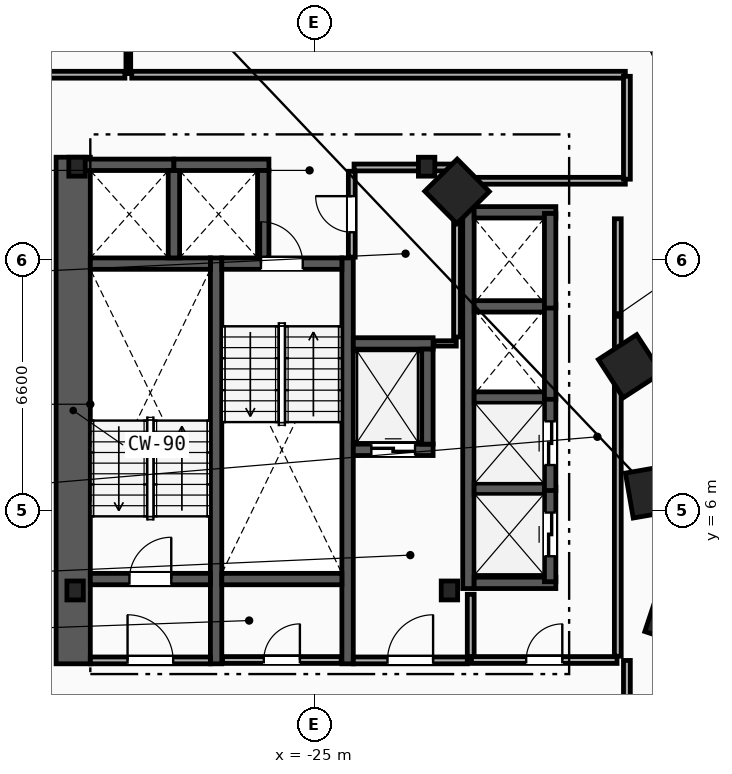
"""IFC4 building model, lengths in metres.
Left out: names, types, materials, properties, quantities, classifications, styles, units other than length and angle.
Written with IfcOpenShell. Run it as: python <this file> out.ifc"""

import sys

from ifc_helpers import new_model, si_unit, direction, frame, frame_2d, origin, origin_2d, place, context, subcontext, project, spatial, rectangle, i_section, extrude, element, fill, save


model = new_model("IFC4")
c1 = context("Model", 3, precision=1e-05, world=origin(), true_north=direction((0.0, 1.0)))
c2 = subcontext(c1, "Body", "Model", "MODEL_VIEW")
j1 = project(units=[si_unit("LENGTHUNIT", "METRE"), si_unit("PLANEANGLEUNIT", "RADIAN")], contexts=[c1])
p1 = place(None, origin())
s1 = spatial("IfcSite", under=j1, at=p1, CompositionType="ELEMENT")
p2 = place(p1, origin())
s2 = spatial("IfcBuilding", under=s1, at=p2, CompositionType="ELEMENT")
p3 = place(p2, frame((0.0, 0.0, 69.6)))
s3 = spatial("IfcBuildingStorey", under=s2, at=p3, CompositionType="ELEMENT", Elevation=69.6)
for number, where, z_axis, x_axis in (
    (1, (-31.3, 3.9, 0.0), (0.0, 0.0, 1.0), (1.0, 0.0, 0.0)),
    (2, (-21.45, 3.9, 0.0), (0.0, 0.0, 1.0), (1.0, 0.0, 0.0)),
    (3, (-22.05, 15.05, 0.0), (0.0, 0.0, 1.0), (1.0, 0.0, 0.0)),
    (4, (-31.25, 15.05, 0.0), (0.0, 0.0, 1.0), (1.0, 0.0, 0.0)),
):
    element("IfcColumn", number, at=place(p3, frame(where, z_axis=z_axis, x_axis=x_axis)), inside=s3, PredefinedType="COLUMN", context=c2, shape_type="SweptSolid", body=[
        extrude(i_section(OverallWidth=0.432, OverallDepth=0.498, WebThickness=0.056, FlangeThickness=0.089, FilletRadius=0.018, at=origin_2d()), origin(), (0.0, 0.0, 1.0), 3.8),
    ])
for number, where, z_axis, x_axis in (
    (5, (-15.55, 3.2, 0.0), (0.0, 0.0, 1.0), (0.315, 0.949, 0.0)),
    (6, (-16.125, 6.5, 0.0), (0.0, 0.0, 1.0), (-0.172, 0.985, 0.0)),
    (7, (-16.7, 9.8, 0.0), (0.0, 0.0, 1.0), (-0.544, 0.839, 0.0)),
    (8, (-21.25, 14.4, 0.0), (0.0, 0.0, 1.0), (-0.703, 0.711, 0.0)),
):
    element("IfcColumn", number, at=place(p3, frame(where, z_axis=z_axis, x_axis=x_axis)), inside=s3, PredefinedType="COLUMN", context=c2, shape_type="SweptSolid", body=[
        extrude(rectangle(XDim=1.2, YDim=1.2, at=origin_2d()), origin(), (0.0, 0.0, 1.0), 3.8),
    ])
p4 = place(p3, frame((-31.35, 1.97, 0.0), z_axis=(0.0, 0.0, 1.0), x_axis=(0.0, 1.0, 0.0)))
e9 = element("IfcWall", 9, at=p4, inside=s3, PredefinedType="SHEAR", context=c2, shape_type="SweptSolid", body=[
    extrude(rectangle(XDim=13.33, YDim=0.9, at=frame_2d((6.665, 0.0))), origin(), (0.0, 0.0, 1.0), 3.5),
])
for number, where, z_axis, x_axis in (
    (10, (-27.59, 1.97, 0.0), (0.0, 0.0, 1.0), (0.0, 1.0, 0.0)),
    (11, (-24.13, 1.97, 0.0), (0.0, 0.0, 1.0), (0.0, 1.0, 0.0)),
):
    element("IfcWall", number, at=place(p3, frame(where, z_axis=z_axis, x_axis=x_axis)), inside=s3, PredefinedType="SHEAR", context=c2, shape_type="SweptSolid", body=[
        extrude(rectangle(XDim=10.68, YDim=0.3, at=frame_2d((5.34, 0.0))), origin(), (0.0, 0.0, 1.0), 3.5),
    ])
p5 = place(p3, frame((-30.9, 4.2, 0.0), z_axis=(0.0, 0.0, 1.0), x_axis=(1.0, 0.0, 0.0)))
e12 = element("IfcWall", 12, at=p5, inside=s3, PredefinedType="SHEAR", context=c2, shape_type="SweptSolid", body=[
    extrude(rectangle(XDim=3.16, YDim=0.3, at=frame_2d((1.58, 0.0))), origin(), (0.0, 0.0, 1.0), 3.5),
])
p6 = place(p5, frame((1.03, 0.0, 0.0)))
e13 = element("IfcOpeningElement", 13, at=p6, cuts=e12, PredefinedType="OPENING", context=c2, shape_type="SweptSolid", body=[
    extrude(rectangle(XDim=1.1, YDim=2.15, at=frame_2d((0.55, 1.075))), frame((0.0, 0.16, 0.0), z_axis=(0.0, -1.0, 0.0), x_axis=(1.0, 0.0, 0.0)), (0.0, 0.0, 1.0), 0.32),
])
p7 = place(p3, frame((-30.9, 12.5, 0.0), z_axis=(0.0, 0.0, 1.0), x_axis=(1.0, 0.0, 0.0)))
e14 = element("IfcWall", 14, at=p7, inside=s3, PredefinedType="SHEAR", context=c2, shape_type="SweptSolid", body=[
    extrude(rectangle(XDim=3.16, YDim=0.3, at=frame_2d((1.58, 0.0))), origin(), (0.0, 0.0, 1.0), 3.5),
])
p8 = place(p3, frame((-27.44, 12.5, 0.0), z_axis=(0.0, 0.0, 1.0), x_axis=(1.0, 0.0, 0.0)))
e15 = element("IfcWall", 15, at=p8, inside=s3, PredefinedType="SHEAR", context=c2, shape_type="SweptSolid", body=[
    extrude(rectangle(XDim=3.16, YDim=0.3, at=frame_2d((1.58, 0.0))), origin(), (0.0, 0.0, 1.0), 3.5),
])
p9 = place(p8, frame((1.03, 0.0, 0.0)))
e16 = element("IfcOpeningElement", 16, at=p9, cuts=e15, PredefinedType="OPENING", context=c2, shape_type="SweptSolid", body=[
    extrude(rectangle(XDim=1.1, YDim=2.15, at=frame_2d((0.55, 1.075))), frame((0.0, 0.16, 0.0), z_axis=(0.0, -1.0, 0.0), x_axis=(1.0, 0.0, 0.0)), (0.0, 0.0, 1.0), 0.32),
])
p10 = place(p3, frame((-27.44, 4.2, 0.0), z_axis=(0.0, 0.0, 1.0), x_axis=(1.0, 0.0, 0.0)))
e17 = element("IfcWall", 17, at=p10, inside=s3, PredefinedType="SHEAR", context=c2, shape_type="SweptSolid", body=[
    extrude(rectangle(XDim=3.16, YDim=0.3, at=frame_2d((1.58, 0.0))), origin(), (0.0, 0.0, 1.0), 3.5),
])
p11 = place(p3, frame((-20.89, 2.15, 0.0), z_axis=(0.0, 0.0, 1.0), x_axis=(0.0, 1.0, 0.0)))
e18 = element("IfcWall", 18, at=p11, inside=s3, PredefinedType="PARTITIONING", context=c2, shape_type="SweptSolid", body=[
    extrude(rectangle(XDim=1.65, YDim=0.18, at=frame_2d((0.825, 0.0))), origin(), (0.0, 0.0, 1.0), 3.5),
])
p12 = place(p3, frame((-23.98, 2.06, 0.0), z_axis=(0.0, 0.0, 1.0), x_axis=(1.0, 0.0, 0.0)))
e19 = element("IfcWall", 19, at=p12, inside=s3, PredefinedType="PARTITIONING", context=c2, shape_type="SweptSolid", body=[
    extrude(rectangle(XDim=3.0, YDim=0.18, at=frame_2d((1.5, 0.0))), origin(), (0.0, 0.0, 1.0), 3.5),
])
p13 = place(p12, frame((0.9, 0.0, 0.0)))
e20 = element("IfcOpeningElement", 20, at=p13, cuts=e19, PredefinedType="OPENING", context=c2, shape_type="SweptSolid", body=[
    extrude(rectangle(XDim=1.2, YDim=2.15, at=frame_2d((0.6, 1.075))), frame((0.0, 0.1, 0.0), z_axis=(0.0, -1.0, 0.0), x_axis=(1.0, 0.0, 0.0)), (0.0, 0.0, 1.0), 0.2),
])
p14 = place(p3, frame((-30.9, 2.06, 0.0), z_axis=(0.0, 0.0, 1.0), x_axis=(1.0, 0.0, 0.0)))
e21 = element("IfcWall", 21, at=p14, inside=s3, PredefinedType="PARTITIONING", context=c2, shape_type="SweptSolid", body=[
    extrude(rectangle(XDim=3.16, YDim=0.18, at=frame_2d((1.58, 0.0))), origin(), (0.0, 0.0, 1.0), 3.5),
])
p15 = place(p14, frame((0.98, 0.0, 0.0)))
e22 = element("IfcOpeningElement", 22, at=p15, cuts=e21, PredefinedType="OPENING", context=c2, shape_type="SweptSolid", body=[
    extrude(rectangle(XDim=1.2, YDim=2.15, at=frame_2d((0.6, 1.075))), frame((0.0, 0.1, 0.0), z_axis=(0.0, -1.0, 0.0), x_axis=(1.0, 0.0, 0.0)), (0.0, 0.0, 1.0), 0.2),
])
p16 = place(p3, frame((-23.98, 7.6, 0.0), z_axis=(0.0, 0.0, 1.0), x_axis=(1.0, 0.0, 0.0)))
e23 = element("IfcWall", 23, at=p16, inside=s3, PredefinedType="SHEAR", context=c2, shape_type="SweptSolid", body=[
    extrude(rectangle(XDim=2.1, YDim=0.3, at=frame_2d((1.05, 0.0))), origin(), (0.0, 0.0, 1.0), 3.5),
])
p17 = place(p16, frame((0.475, 0.0, 0.0)))
e24 = element("IfcOpeningElement", 24, at=p17, cuts=e23, PredefinedType="OPENING", context=c2, shape_type="SweptSolid", body=[
    extrude(rectangle(XDim=1.15, YDim=2.2, at=frame_2d((0.575, 1.1))), frame((0.0, 0.16, 0.0), z_axis=(0.0, -1.0, 0.0), x_axis=(1.0, 0.0, 0.0)), (0.0, 0.0, 1.0), 0.32),
])
p18 = place(p3, frame((-23.98, 10.4, 0.0), z_axis=(0.0, 0.0, 1.0), x_axis=(1.0, 0.0, 0.0)))
e25 = element("IfcWall", 25, at=p18, inside=s3, PredefinedType="SHEAR", context=c2, shape_type="SweptSolid", body=[
    extrude(rectangle(XDim=2.1, YDim=0.3, at=frame_2d((1.05, 0.0))), origin(), (0.0, 0.0, 1.0), 3.5),
])
for number, where, z_axis, x_axis in (
    (26, (-22.03, 7.75, 0.0), (0.0, 0.0, 1.0), (0.0, 1.0, 0.0)),
    (27, (-31.2, 15.1, 0.0), (0.0, 0.0, 1.0), (1.0, 0.0, 0.0)),
):
    element("IfcWall", number, at=place(p3, frame(where, z_axis=z_axis, x_axis=x_axis)), inside=s3, PredefinedType="SHEAR", context=c2, shape_type="SweptSolid", body=[
        extrude(rectangle(XDim=2.5, YDim=0.3, at=frame_2d((1.25, 0.0))), origin(), (0.0, 0.0, 1.0), 3.5),
    ])
p19 = place(p3, frame((-28.7, 12.65, 0.0), z_axis=(0.0, 0.0, 1.0), x_axis=(0.0, 1.0, 0.0)))
e28 = element("IfcWall", 28, at=p19, inside=s3, PredefinedType="SHEAR", context=c2, shape_type="SweptSolid", body=[
    extrude(rectangle(XDim=2.3, YDim=0.3, at=frame_2d((1.15, 0.0))), origin(), (0.0, 0.0, 1.0), 3.5),
])
p20 = place(p3, frame((-28.7, 15.1, 0.0), z_axis=(0.0, 0.0, 1.0), x_axis=(1.0, 0.0, 0.0)))
e29 = element("IfcWall", 29, at=p20, inside=s3, PredefinedType="SHEAR", context=c2, shape_type="SweptSolid", body=[
    extrude(rectangle(XDim=2.5, YDim=0.3, at=frame_2d((1.25, 0.0))), origin(), (0.0, 0.0, 1.0), 3.5),
])
p21 = place(p3, frame((-26.35, 12.65, 0.0), z_axis=(0.0, 0.0, 1.0), x_axis=(0.0, 1.0, 0.0)))
e30 = element("IfcWall", 30, at=p21, inside=s3, PredefinedType="SHEAR", context=c2, shape_type="SweptSolid", body=[
    extrude(rectangle(XDim=2.3, YDim=0.3, at=frame_2d((1.15, 0.0))), origin(), (0.0, 0.0, 1.0), 3.5),
])
p22 = place(p3, frame((-20.95, 3.95, 0.0), z_axis=(0.0, 0.0, 1.0), x_axis=(0.0, 1.0, 0.0)))
e31 = element("IfcWall", 31, at=p22, inside=s3, PredefinedType="SHEAR", context=c2, shape_type="SweptSolid", body=[
    extrude(rectangle(XDim=10.05, YDim=0.3, at=frame_2d((5.025, 0.0))), origin(), (0.0, 0.0, 1.0), 3.5),
])
for number, where, z_axis, x_axis in (
    (32, (-20.8, 4.1, 0.0), (0.0, 0.0, 1.0), (1.0, 0.0, 0.0)),
    (33, (-20.8, 13.85, 0.0), (0.0, 0.0, 1.0), (1.0, 0.0, 0.0)),
):
    element("IfcWall", number, at=place(p3, frame(where, z_axis=z_axis, x_axis=x_axis)), inside=s3, PredefinedType="SHEAR", context=c2, shape_type="SweptSolid", body=[
        extrude(rectangle(XDim=2.15, YDim=0.3, at=frame_2d((1.075, 0.0))), origin(), (0.0, 0.0, 1.0), 3.5),
    ])
for number, where, z_axis, x_axis in (
    (34, (-20.8, 6.575, 0.0), (0.0, 0.0, 1.0), (1.0, 0.0, 0.0)),
    (35, (-20.8, 8.975, 0.0), (0.0, 0.0, 1.0), (1.0, 0.0, 0.0)),
    (36, (-20.8, 11.375, 0.0), (0.0, 0.0, 1.0), (1.0, 0.0, 0.0)),
):
    element("IfcWall", number, at=place(p3, frame(where, z_axis=z_axis, x_axis=x_axis)), inside=s3, PredefinedType="SHEAR", context=c2, shape_type="SweptSolid", body=[
        extrude(rectangle(XDim=1.85, YDim=0.3, at=frame_2d((0.925, 0.0))), origin(), (0.0, 0.0, 1.0), 3.5),
    ])
p23 = place(p3, frame((-18.8, 4.13, 0.0), z_axis=(0.0, 0.0, 1.0), x_axis=(0.0, 1.0, 0.0)))
e37 = element("IfcWall", 37, at=p23, inside=s3, PredefinedType="SHEAR", context=c2, shape_type="SweptSolid", body=[
    extrude(rectangle(XDim=2.49, YDim=0.3, at=frame_2d((1.245, 0.0))), origin(), (0.0, 0.0, 1.0), 3.5),
])
p24 = place(p23, frame((0.67, 0.0, 0.0)))
e38 = element("IfcOpeningElement", 38, at=p24, cuts=e37, PredefinedType="OPENING", context=c2, shape_type="SweptSolid", body=[
    extrude(rectangle(XDim=1.15, YDim=2.2, at=frame_2d((0.575, 1.1))), frame((0.0, 0.16, 0.0), z_axis=(0.0, -1.0, 0.0), x_axis=(1.0, 0.0, 0.0)), (0.0, 0.0, 1.0), 0.32),
])
p25 = place(p3, frame((-18.8, 6.53, 0.0), z_axis=(0.0, 0.0, 1.0), x_axis=(0.0, 1.0, 0.0)))
e39 = element("IfcWall", 39, at=p25, inside=s3, PredefinedType="SHEAR", context=c2, shape_type="SweptSolid", body=[
    extrude(rectangle(XDim=2.49, YDim=0.3, at=frame_2d((1.245, 0.0))), origin(), (0.0, 0.0, 1.0), 3.5),
])
p26 = place(p25, frame((0.67, 0.0, 0.0)))
e40 = element("IfcOpeningElement", 40, at=p26, cuts=e39, PredefinedType="OPENING", context=c2, shape_type="SweptSolid", body=[
    extrude(rectangle(XDim=1.15, YDim=2.2, at=frame_2d((0.575, 1.1))), frame((0.0, 0.16, 0.0), z_axis=(0.0, -1.0, 0.0), x_axis=(1.0, 0.0, 0.0)), (0.0, 0.0, 1.0), 0.32),
])
for number, where, z_axis, x_axis in (
    (41, (-18.8, 8.93, 0.0), (0.0, 0.0, 1.0), (0.0, 1.0, 0.0)),
    (42, (-18.8, 11.33, 0.0), (0.0, 0.0, 1.0), (0.0, 1.0, 0.0)),
):
    element("IfcWall", number, at=place(p3, frame(where, z_axis=z_axis, x_axis=x_axis)), inside=s3, PredefinedType="SHEAR", context=c2, shape_type="SweptSolid", body=[
        extrude(rectangle(XDim=2.49, YDim=0.3, at=frame_2d((1.245, 0.0))), origin(), (0.0, 0.0, 1.0), 3.5),
    ])
p27 = place(p3, frame((-17.02, 2.17, 0.0), z_axis=(0.0, 0.0, 1.0), x_axis=(0.0, 1.0, 0.0)))
e43 = element("IfcWall", 43, at=p27, inside=s3, PredefinedType="PARTITIONING", context=c2, shape_type="SweptSolid", body=[
    extrude(rectangle(XDim=11.51, YDim=0.18, at=frame_2d((5.755, 0.0))), origin(), (0.0, 0.0, 1.0), 3.5),
])
p28 = place(p3, frame((-20.87, 2.07, 0.0), z_axis=(0.0, 0.0, 1.0), x_axis=(1.0, 0.0, 0.0)))
e44 = element("IfcWall", 44, at=p28, inside=s3, PredefinedType="PARTITIONING", context=c2, shape_type="SweptSolid", body=[
    extrude(rectangle(XDim=3.83, YDim=0.18, at=frame_2d((1.915, 0.0))), origin(), (0.0, 0.0, 1.0), 3.5),
])
p29 = place(p28, frame((1.44, 0.0, 0.0)))
e45 = element("IfcOpeningElement", 45, at=p29, cuts=e44, PredefinedType="OPENING", context=c2, shape_type="SweptSolid", body=[
    extrude(rectangle(XDim=0.95, YDim=2.1, at=frame_2d((0.475, 1.05))), frame((0.0, 0.1, 0.0), z_axis=(0.0, -1.0, 0.0), x_axis=(1.0, 0.0, 0.0)), (0.0, 0.0, 1.0), 0.2),
])
p30 = place(p3, frame((-21.86, 10.4, 0.0), z_axis=(0.0, 0.0, 1.0), x_axis=(1.0, 0.0, 0.0)))
e46 = element("IfcWall", 46, at=p30, inside=s3, PredefinedType="PARTITIONING", context=c2, shape_type="SweptSolid", body=[
    extrude(rectangle(XDim=0.59, YDim=0.14, at=frame_2d((0.295, 0.0))), origin(), (0.0, 0.0, 1.0), 3.5),
])
p31 = place(p3, frame((-21.25, 10.57, 0.0), z_axis=(0.0, 0.0, 1.0), x_axis=(0.0, 1.0, 0.0)))
e47 = element("IfcWall", 47, at=p31, inside=s3, PredefinedType="PARTITIONING", context=c2, shape_type="SweptSolid", body=[
    extrude(rectangle(XDim=4.36, YDim=0.18, at=frame_2d((2.18, 0.0))), origin(), (0.0, 0.0, 1.0), 3.5),
])
p32 = place(p3, frame((-23.96, 15.03, 0.0), z_axis=(0.0, 0.0, 1.0), x_axis=(1.0, 0.0, 0.0)))
e48 = element("IfcWall", 48, at=p32, inside=s3, PredefinedType="PARTITIONING", context=c2, shape_type="SweptSolid", body=[
    extrude(rectangle(XDim=2.61, YDim=0.18, at=frame_2d((1.305, 0.0))), origin(), (0.0, 0.0, 1.0), 2.573),
])
p33 = place(p3, frame((-27.42, 2.07, 0.0), z_axis=(0.0, 0.0, 1.0), x_axis=(1.0, 0.0, 0.0)))
e49 = element("IfcWall", 49, at=p33, inside=s3, PredefinedType="PARTITIONING", context=c2, shape_type="SweptSolid", body=[
    extrude(rectangle(XDim=3.12, YDim=0.18, at=frame_2d((1.56, 0.0))), origin(), (0.0, 0.0, 1.0), 3.5),
])
p34 = place(p33, frame((1.085, 0.0, 0.0)))
e50 = element("IfcOpeningElement", 50, at=p34, cuts=e49, PredefinedType="OPENING", context=c2, shape_type="SweptSolid", body=[
    extrude(rectangle(XDim=0.95, YDim=2.1, at=frame_2d((0.475, 1.05))), frame((0.0, 0.1, 0.0), z_axis=(0.0, -1.0, 0.0), x_axis=(1.0, 0.0, 0.0)), (0.0, 0.0, 1.0), 0.2),
])
p35 = place(p3, frame((-24.02, 12.67, 0.0), z_axis=(0.0, 0.0, 1.0), x_axis=(0.0, 1.0, 0.0)))
e51 = element("IfcWall", 51, at=p35, inside=s3, PredefinedType="PARTITIONING", context=c2, shape_type="SweptSolid", body=[
    extrude(rectangle(XDim=2.26, YDim=0.18, at=frame_2d((1.13, 0.0))), origin(), (0.0, 0.0, 1.0), 3.5),
])
p36 = place(p35, frame((0.655, 0.0, 0.0)))
e52 = element("IfcOpeningElement", 52, at=p36, cuts=e51, PredefinedType="OPENING", context=c2, shape_type="SweptSolid", body=[
    extrude(rectangle(XDim=0.95, YDim=2.1, at=frame_2d((0.475, 1.05))), frame((0.0, 0.1, 0.0), z_axis=(0.0, -1.0, 0.0), x_axis=(1.0, 0.0, 0.0)), (0.0, 0.0, 1.0), 0.2),
])
p37 = place(p3, frame((-29.9, 17.5, 0.0), z_axis=(0.0, 0.0, 1.0), x_axis=(0.0, 1.0, 0.0)))
e53 = element("IfcWall", 53, at=p37, inside=s3, PredefinedType="PARTITIONING", context=c2, shape_type="SweptSolid", body=[
    extrude(rectangle(XDim=8.485, YDim=0.125, at=frame_2d((4.243, 0.0))), origin(), (0.0, 0.0, 1.0), 3.5),
])
p38 = place(p3, frame((-16.822, 17.47, 0.0), z_axis=(0.0, 0.0, 1.0), x_axis=(-1.0, 0.0, 0.0)))
e54 = element("IfcWall", 54, at=p38, inside=s3, PredefinedType="PARTITIONING", context=c2, shape_type="SweptSolid", body=[
    extrude(rectangle(XDim=12.989, YDim=0.18, at=frame_2d((6.494, 0.0))), origin(), (0.0, 0.0, 1.0), 3.5),
])
p39 = place(p3, frame((-21.178, 14.68, 0.0), z_axis=(0.0, 0.0, 1.0), x_axis=(1.0, 0.0, 0.0)))
e55 = element("IfcWall", 55, at=p39, inside=s3, PredefinedType="PARTITIONING", context=c2, shape_type="SweptSolid", body=[
    extrude(rectangle(XDim=4.357, YDim=0.18, at=frame_2d((2.178, 0.0))), origin(), (0.0, 0.0, 1.0), 3.5),
])
p40 = place(p3, frame((-29.99, 17.47, 0.0), z_axis=(0.0, 0.0, 1.0), x_axis=(-1.0, 0.0, 0.0)))
e56 = element("IfcWall", 56, at=p40, inside=s3, PredefinedType="PARTITIONING", context=c2, shape_type="SweptSolid", body=[
    extrude(rectangle(XDim=3.638, YDim=0.18, at=frame_2d((1.819, 0.0))), origin(), (0.0, 0.0, 1.0), 3.5),
])
p41 = place(p3, frame((-16.78, 14.721, 0.0), z_axis=(0.0, 0.0, 1.0), x_axis=(0.0, 1.0, 0.0)))
e57 = element("IfcWall", 57, at=p41, inside=s3, PredefinedType="PARTITIONING", context=c2, shape_type="SweptSolid", body=[
    extrude(rectangle(XDim=2.707, YDim=0.18, at=frame_2d((1.354, 0.0))), origin(), (0.0, 0.0, 1.0), 3.5),
])
p42 = place(p3, frame((-16.78, -0.329, 0.0), z_axis=(0.0, 0.0, 1.0), x_axis=(0.0, 1.0, 0.0)))
e58 = element("IfcWall", 58, at=p42, inside=s3, PredefinedType="PARTITIONING", context=c2, shape_type="SweptSolid", body=[
    extrude(rectangle(XDim=2.387, YDim=0.18, at=frame_2d((1.194, 0.0))), origin(), (0.0, 0.0, 1.0), 3.5),
])
p43 = place(p6, origin())
e59 = element("IfcDoor", 59, at=p43, inside=s3, OperationType="SINGLE_SWING_RIGHT", PredefinedType="DOOR", context=c2, shape_type="SweptSolid", body=[
    extrude(rectangle(XDim=1.1, YDim=2.15, at=frame_2d((0.55, 1.075))), frame((0.0, 0.025, 0.0), z_axis=(0.0, -1.0, 0.0), x_axis=(1.0, 0.0, 0.0)), (0.0, 0.0, 1.0), 0.05),
])
fill(e13, e59)
p44 = place(p9, origin())
e60 = element("IfcDoor", 60, at=p44, inside=s3, OperationType="SINGLE_SWING_LEFT", PredefinedType="DOOR", context=c2, shape_type="SweptSolid", body=[
    extrude(rectangle(XDim=1.1, YDim=2.15, at=frame_2d((0.55, 1.075))), frame((0.0, 0.025, 0.0), z_axis=(0.0, -1.0, 0.0), x_axis=(1.0, 0.0, 0.0)), (0.0, 0.0, 1.0), 0.05),
])
fill(e16, e60)
p45 = place(p13, origin())
e61 = element("IfcDoor", 61, at=p45, inside=s3, OperationType="SINGLE_SWING_RIGHT", PredefinedType="DOOR", context=c2, shape_type="SweptSolid", body=[
    extrude(rectangle(XDim=1.2, YDim=2.15, at=frame_2d((0.6, 1.075))), frame((0.0, 0.025, 0.0), z_axis=(0.0, -1.0, 0.0), x_axis=(1.0, 0.0, 0.0)), (0.0, 0.0, 1.0), 0.05),
])
fill(e20, e61)
p46 = place(p15, origin())
e62 = element("IfcDoor", 62, at=p46, inside=s3, OperationType="SINGLE_SWING_LEFT", PredefinedType="DOOR", context=c2, shape_type="SweptSolid", body=[
    extrude(rectangle(XDim=1.2, YDim=2.15, at=frame_2d((0.6, 1.075))), frame((0.0, 0.025, 0.0), z_axis=(0.0, -1.0, 0.0), x_axis=(1.0, 0.0, 0.0)), (0.0, 0.0, 1.0), 0.05),
])
fill(e22, e62)
p47 = place(p17, origin())
e63 = element("IfcDoor", 63, at=p47, inside=s3, OperationType="SLIDING_TO_LEFT", PredefinedType="TRAPDOOR", context=c2, shape_type="SweptSolid", body=[
    extrude(rectangle(XDim=1.15, YDim=2.2, at=frame_2d((0.575, 1.1))), frame((0.0, 0.025, 0.0), z_axis=(0.0, -1.0, 0.0), x_axis=(1.0, 0.0, 0.0)), (0.0, 0.0, 1.0), 0.05),
])
fill(e24, e63)
p48 = place(p24, origin())
e64 = element("IfcDoor", 64, at=p48, inside=s3, OperationType="SLIDING_TO_LEFT", PredefinedType="TRAPDOOR", context=c2, shape_type="SweptSolid", body=[
    extrude(rectangle(XDim=1.15, YDim=2.2, at=frame_2d((0.575, 1.1))), frame((0.0, 0.025, 0.0), z_axis=(0.0, -1.0, 0.0), x_axis=(1.0, 0.0, 0.0)), (0.0, 0.0, 1.0), 0.05),
])
fill(e38, e64)
p49 = place(p26, origin())
e65 = element("IfcDoor", 65, at=p49, inside=s3, OperationType="SLIDING_TO_LEFT", PredefinedType="TRAPDOOR", context=c2, shape_type="SweptSolid", body=[
    extrude(rectangle(XDim=1.15, YDim=2.2, at=frame_2d((0.575, 1.1))), frame((0.0, 0.025, 0.0), z_axis=(0.0, -1.0, 0.0), x_axis=(1.0, 0.0, 0.0)), (0.0, 0.0, 1.0), 0.05),
])
fill(e40, e65)
p50 = place(p29, origin())
e66 = element("IfcDoor", 66, at=p50, inside=s3, OperationType="SINGLE_SWING_RIGHT", PredefinedType="DOOR", context=c2, shape_type="SweptSolid", body=[
    extrude(rectangle(XDim=0.95, YDim=2.1, at=frame_2d((0.475, 1.05))), frame((0.0, 0.025, 0.0), z_axis=(0.0, -1.0, 0.0), x_axis=(1.0, 0.0, 0.0)), (0.0, 0.0, 1.0), 0.05),
])
fill(e45, e66)
p51 = place(p34, origin())
e67 = element("IfcDoor", 67, at=p51, inside=s3, OperationType="SINGLE_SWING_RIGHT", PredefinedType="DOOR", context=c2, shape_type="SweptSolid", body=[
    extrude(rectangle(XDim=0.95, YDim=2.1, at=frame_2d((0.475, 1.05))), frame((0.0, 0.025, 0.0), z_axis=(0.0, -1.0, 0.0), x_axis=(1.0, 0.0, 0.0)), (0.0, 0.0, 1.0), 0.05),
])
fill(e50, e67)
p52 = place(p36, origin())
e68 = element("IfcDoor", 68, at=p52, inside=s3, OperationType="SINGLE_SWING_RIGHT", PredefinedType="DOOR", context=c2, shape_type="SweptSolid", body=[
    extrude(rectangle(XDim=0.95, YDim=2.1, at=frame_2d((0.475, 1.05))), frame((0.0, 0.025, 0.0), z_axis=(0.0, -1.0, 0.0), x_axis=(1.0, 0.0, 0.0)), (0.0, 0.0, 1.0), 0.05),
])
fill(e52, e68)
save(model, sys.argv[1])
